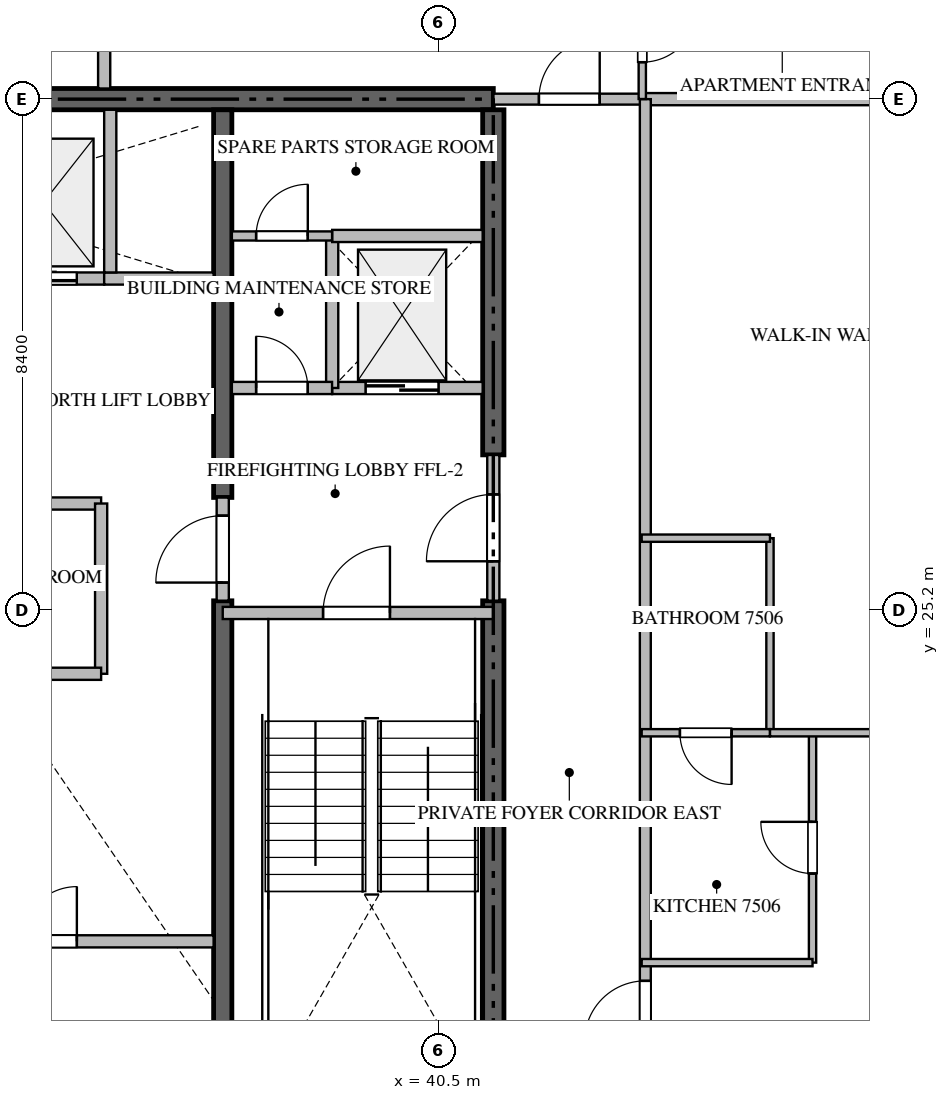
"""IFC4 building model, lengths in metres.
Left out: names, types, materials, properties, quantities, classifications, styles, units other than length and angle.
Written with IfcOpenShell. Run it as: python <this file> out.ifc"""

import sys

from ifc_helpers import new_model, si_unit, direction, frame, frame_2d, origin, place, context, subcontext, project, spatial, rectangle, extrude, source, transform, mapped, element, fill, save


model = new_model("IFC4")
c1 = context("Model", 3, precision=1e-05, world=origin(), true_north=direction((0.0, 1.0)))
c2 = subcontext(c1, "Body", "Model", "MODEL_VIEW")
j1 = project(units=[si_unit("LENGTHUNIT", "METRE"), si_unit("PLANEANGLEUNIT", "RADIAN")], contexts=[c1])
p1 = place(None, origin())
s1 = spatial("IfcSite", under=j1, at=p1, CompositionType="ELEMENT")
p2 = place(p1, origin())
s2 = spatial("IfcBuilding", under=s1, at=p2, CompositionType="ELEMENT")
p3 = place(p2, frame((0.0, 0.0, 301.55)))
s3 = spatial("IfcBuildingStorey", under=s2, at=p3, CompositionType="ELEMENT", Elevation=301.55)
p4 = place(p3, frame((41.4, 33.6, -0.26), z_axis=(0.0, 0.0, 1.0), x_axis=(-1.0, 0.0, 0.0)))
e1 = element("IfcWall", 1, at=p4, inside=s3, PredefinedType="SHEAR", context=c2, shape_type="SweptSolid", body=[
    extrude(rectangle(XDim=18.0, YDim=0.35, at=frame_2d((9.0, 0.0))), origin(), (0.0, 0.0, 1.0), 4.048),
])
p5 = place(p3, frame((41.4, 16.975, -0.26), z_axis=(0.0, 0.0, 1.0), x_axis=(0.0, 1.0, 0.0)))
e2 = element("IfcWall", 2, at=p5, inside=s3, PredefinedType="SHEAR", context=c2, shape_type="SweptSolid", body=[
    extrude(rectangle(XDim=8.375, YDim=0.35, at=frame_2d((4.188, 0.0))), origin(), (0.0, 0.0, 1.0), 4.048),
])
p6 = place(p3, frame((41.4, 27.75, -0.26), z_axis=(0.0, 0.0, 1.0), x_axis=(0.0, 1.0, 0.0)))
e3 = element("IfcWall", 3, at=p6, inside=s3, PredefinedType="SHEAR", context=c2, shape_type="SweptSolid", body=[
    extrude(rectangle(XDim=5.675, YDim=0.35, at=frame_2d((2.837, 0.0))), origin(), (0.0, 0.0, 1.0), 4.048),
])
p7 = place(p3, frame((36.95, 16.975, -0.26), z_axis=(0.0, 0.0, 1.0), x_axis=(0.0, 1.0, 0.0)))
e4 = element("IfcWall", 4, at=p7, inside=s3, PredefinedType="SHEAR", context=c2, shape_type="SweptSolid", body=[
    extrude(rectangle(XDim=8.375, YDim=0.3, at=frame_2d((4.188, 0.0))), origin(), (0.0, 0.0, 1.0), 4.048),
])
p8 = place(p3, frame((36.95, 27.05, -0.26), z_axis=(0.0, 0.0, 1.0), x_axis=(0.0, 1.0, 0.0)))
e5 = element("IfcWall", 5, at=p8, inside=s3, PredefinedType="SHEAR", context=c2, shape_type="SweptSolid", body=[
    extrude(rectangle(XDim=6.375, YDim=0.3, at=frame_2d((3.188, 0.0))), origin(), (0.0, 0.0, 1.0), 4.048),
])
p9 = place(p3, frame((36.95, 25.15, 0.0), z_axis=(0.0, 0.0, 1.0), x_axis=(1.0, 0.0, 0.0)))
e6 = element("IfcWall", 6, at=p9, inside=s3, PredefinedType="STANDARD", context=c2, shape_type="SweptSolid", body=[
    extrude(rectangle(XDim=4.45, YDim=0.2, at=frame_2d((2.225, 0.0))), origin(), (0.0, 0.0, 1.0), 3.79),
])
p10 = place(p9, frame((1.65, 0.0, 0.0)))
e7 = element("IfcOpeningElement", 7, at=p10, cuts=e6, PredefinedType="OPENING", context=c2, shape_type="SweptSolid", body=[
    extrude(rectangle(XDim=1.1, YDim=2.15, at=frame_2d((0.55, 1.075))), frame((0.0, 0.11, 0.0), z_axis=(0.0, -1.0, 0.0), x_axis=(1.0, 0.0, 0.0)), (0.0, 0.0, 1.0), 0.22),
])
p11 = place(p3, frame((38.75, 28.85, 0.0), z_axis=(0.0, 0.0, 1.0), x_axis=(1.0, 0.0, 0.0)))
e8 = element("IfcWall", 8, at=p11, inside=s3, PredefinedType="STANDARD", context=c2, shape_type="SweptSolid", body=[
    extrude(rectangle(XDim=2.475, YDim=0.2, at=frame_2d((1.238, 0.0))), origin(), (0.0, 0.0, 1.0), 3.79),
])
p12 = place(p11, frame((0.55, 0.0, 0.0)))
e9 = element("IfcOpeningElement", 9, at=p12, cuts=e8, PredefinedType="OPENING", context=c2, shape_type="SweptSolid", body=[
    extrude(rectangle(XDim=1.2, YDim=2.2, at=frame_2d((0.6, 1.1))), frame((0.0, 0.11, 0.0), z_axis=(0.0, -1.0, 0.0), x_axis=(1.0, 0.0, 0.0)), (0.0, 0.0, 1.0), 0.22),
])
p13 = place(p3, frame((32.85, 30.65, 0.0), z_axis=(0.0, 0.0, 1.0), x_axis=(1.0, 0.0, 0.0)))
e10 = element("IfcWall", 10, at=p13, inside=s3, PredefinedType="STANDARD", context=c2, shape_type="SweptSolid", body=[
    extrude(rectangle(XDim=2.15, YDim=0.2, at=frame_2d((1.075, 0.0))), origin(), (0.0, 0.0, 1.0), 3.79),
])
p14 = place(p13, frame((0.6, 0.0, 0.0)))
e11 = element("IfcOpeningElement", 11, at=p14, cuts=e10, PredefinedType="OPENING", context=c2, shape_type="SweptSolid", body=[
    extrude(rectangle(XDim=1.1, YDim=2.2, at=frame_2d((0.55, 1.1))), frame((0.0, 0.11, 0.0), z_axis=(0.0, -1.0, 0.0), x_axis=(1.0, 0.0, 0.0)), (0.0, 0.0, 1.0), 0.22),
])
p15 = place(p3, frame((35.0, 30.65, 0.0), z_axis=(0.0, 0.0, 1.0), x_axis=(1.0, 0.0, 0.0)))
e12 = element("IfcWall", 12, at=p15, inside=s3, PredefinedType="STANDARD", context=c2, shape_type="SweptSolid", body=[
    extrude(rectangle(XDim=1.8, YDim=0.2, at=frame_2d((0.9, 0.0))), origin(), (0.0, 0.0, 1.0), 3.79),
])
p16 = place(p3, frame((35.1, 30.75, 0.0), z_axis=(0.0, 0.0, 1.0), x_axis=(0.0, 1.0, 0.0)))
e13 = element("IfcWall", 13, at=p16, inside=s3, PredefinedType="STANDARD", context=c2, shape_type="SweptSolid", body=[
    extrude(rectangle(XDim=2.675, YDim=0.2, at=frame_2d((1.337, 0.0))), origin(), (0.0, 0.0, 1.0), 3.79),
])
p17 = place(p3, frame((38.75, 28.85, 0.0), z_axis=(0.0, 0.0, 1.0), x_axis=(0.0, 1.0, 0.0)))
e14 = element("IfcWall", 14, at=p17, inside=s3, PredefinedType="STANDARD", context=c2, shape_type="SweptSolid", body=[
    extrude(rectangle(XDim=2.5, YDim=0.2, at=frame_2d((1.25, 0.0))), origin(), (0.0, 0.0, 1.0), 3.79),
])
p18 = place(p3, frame((38.75, 31.35, 0.0), z_axis=(0.0, 0.0, 1.0), x_axis=(1.0, 0.0, 0.0)))
e15 = element("IfcWall", 15, at=p18, inside=s3, PredefinedType="STANDARD", context=c2, shape_type="SweptSolid", body=[
    extrude(rectangle(XDim=2.475, YDim=0.2, at=frame_2d((1.238, 0.0))), origin(), (0.0, 0.0, 1.0), 3.79),
])
p19 = place(p3, frame((37.1, 28.85, 0.0), z_axis=(0.0, 0.0, 1.0), x_axis=(1.0, 0.0, 0.0)))
e16 = element("IfcWall", 16, at=p19, inside=s3, PredefinedType="STANDARD", context=c2, shape_type="SweptSolid", body=[
    extrude(rectangle(XDim=1.648, YDim=0.2, at=frame_2d((0.824, 0.0))), origin(), (0.0, 0.0, 1.0), 3.79),
])
p20 = place(p19, frame((0.399, 0.0, 0.0)))
e17 = element("IfcOpeningElement", 17, at=p20, cuts=e16, PredefinedType="OPENING", context=c2, shape_type="SweptSolid", body=[
    extrude(rectangle(XDim=0.85, YDim=2.1, at=frame_2d((0.425, 1.05))), frame((0.0, 0.11, 0.0), z_axis=(0.0, -1.0, 0.0), x_axis=(1.0, 0.0, 0.0)), (0.0, 0.0, 1.0), 0.22),
])
p21 = place(p3, frame((41.4, 25.352, 0.0), z_axis=(0.0, 0.0, 1.0), x_axis=(0.0, 1.0, 0.0)))
e18 = element("IfcWall", 18, at=p21, inside=s3, PredefinedType="STANDARD", context=c2, shape_type="SweptSolid", body=[
    extrude(rectangle(XDim=2.396, YDim=0.2, at=frame_2d((1.198, 0.0))), origin(), (0.0, 0.0, 1.0), 3.79),
])
p22 = place(p21, frame((0.648, 0.0, 0.0)))
e19 = element("IfcOpeningElement", 19, at=p22, cuts=e18, PredefinedType="OPENING", context=c2, shape_type="SweptSolid", body=[
    extrude(rectangle(XDim=1.1, YDim=2.15, at=frame_2d((0.55, 1.075))), frame((0.0, 0.11, 0.0), z_axis=(0.0, -1.0, 0.0), x_axis=(1.0, 0.0, 0.0)), (0.0, 0.0, 1.0), 0.22),
])
p23 = place(p3, frame((36.95, 25.352, 0.0), z_axis=(0.0, 0.0, 1.0), x_axis=(0.0, 1.0, 0.0)))
e20 = element("IfcWall", 20, at=p23, inside=s3, PredefinedType="STANDARD", context=c2, shape_type="SweptSolid", body=[
    extrude(rectangle(XDim=1.696, YDim=0.2, at=frame_2d((0.848, 0.0))), origin(), (0.0, 0.0, 1.0), 3.79),
])
p24 = place(p23, frame((0.298, 0.0, 0.0)))
e21 = element("IfcOpeningElement", 21, at=p24, cuts=e20, PredefinedType="OPENING", context=c2, shape_type="SweptSolid", body=[
    extrude(rectangle(XDim=1.1, YDim=2.15, at=frame_2d((0.55, 1.075))), frame((0.0, 0.11, 0.0), z_axis=(0.0, -1.0, 0.0), x_axis=(1.0, 0.0, 0.0)), (0.0, 0.0, 1.0), 0.22),
])
p25 = place(p3, frame((37.1, 31.35, 0.0), z_axis=(0.0, 0.0, 1.0), x_axis=(1.0, 0.0, 0.0)))
e22 = element("IfcWall", 22, at=p25, inside=s3, PredefinedType="PARTITIONING", context=c2, shape_type="SweptSolid", body=[
    extrude(rectangle(XDim=1.648, YDim=0.15, at=frame_2d((0.824, 0.0))), origin(), (0.0, 0.0, 1.0), 3.79),
])
p26 = place(p25, frame((0.399, 0.0, 0.0)))
e23 = element("IfcOpeningElement", 23, at=p26, cuts=e22, PredefinedType="OPENING", context=c2, shape_type="SweptSolid", body=[
    extrude(rectangle(XDim=0.85, YDim=2.1, at=frame_2d((0.425, 1.05))), frame((0.0, 0.085, 0.0), z_axis=(0.0, -1.0, 0.0), x_axis=(1.0, 0.0, 0.0)), (0.0, 0.0, 1.0), 0.17),
])
p27 = place(p3, frame((31.402, 19.75, 0.0), z_axis=(0.0, 0.0, 1.0), x_axis=(1.0, 0.0, 0.0)))
e24 = element("IfcWall", 24, at=p27, inside=s3, PredefinedType="STANDARD", context=c2, shape_type="SweptSolid", body=[
    extrude(rectangle(XDim=5.398, YDim=0.2, at=frame_2d((2.699, 0.0))), origin(), (0.0, 0.0, 1.0), 3.79),
])
p28 = place(p27, frame((2.249, 0.0, 0.0)))
e25 = element("IfcOpeningElement", 25, at=p28, cuts=e24, PredefinedType="OPENING", context=c2, shape_type="SweptSolid", body=[
    extrude(rectangle(XDim=0.9, YDim=2.1, at=frame_2d((0.45, 1.05))), frame((0.0, 0.11, 0.0), z_axis=(0.0, -1.0, 0.0), x_axis=(1.0, 0.0, 0.0)), (0.0, 0.0, 1.0), 0.22),
])
p29 = place(p3, frame((28.0, 26.95, 0.0), z_axis=(0.0, 0.0, 1.0), x_axis=(1.0, 0.0, 0.0)))
e26 = element("IfcWall", 26, at=p29, inside=s3, PredefinedType="STANDARD", context=c2, shape_type="SweptSolid", body=[
    extrude(rectangle(XDim=6.95, YDim=0.2, at=frame_2d((3.475, 0.0))), origin(), (0.0, 0.0, 1.0), 3.79),
])
p30 = place(p3, frame((34.95, 24.15, 0.0), z_axis=(0.0, 0.0, 1.0), x_axis=(0.0, 1.0, 0.0)))
e27 = element("IfcWall", 27, at=p30, inside=s3, PredefinedType="STANDARD", context=c2, shape_type="SweptSolid", body=[
    extrude(rectangle(XDim=2.8, YDim=0.2, at=frame_2d((1.4, 0.0))), origin(), (0.0, 0.0, 1.0), 3.79),
])
p31 = place(p3, frame((31.5, 24.15, 0.0), z_axis=(0.0, 0.0, 1.0), x_axis=(1.0, 0.0, 0.0)))
e28 = element("IfcWall", 28, at=p31, inside=s3, PredefinedType="STANDARD", context=c2, shape_type="SweptSolid", body=[
    extrude(rectangle(XDim=3.45, YDim=0.2, at=frame_2d((1.725, 0.0))), origin(), (0.0, 0.0, 1.0), 3.79),
])
p32 = place(p31, frame((1.3, 0.0, 0.0)))
e29 = element("IfcOpeningElement", 29, at=p32, cuts=e28, PredefinedType="OPENING", context=c2, shape_type="SweptSolid", body=[
    extrude(rectangle(XDim=0.85, YDim=2.1, at=frame_2d((0.425, 1.05))), frame((0.0, 0.11, 0.0), z_axis=(0.0, -1.0, 0.0), x_axis=(1.0, 0.0, 0.0)), (0.0, 0.0, 1.0), 0.22),
])
p33 = place(p3, frame((35.0, 33.775, 0.0), z_axis=(0.0, 0.0, 1.0), x_axis=(0.0, 1.0, 0.0)))
e30 = element("IfcWall", 30, at=p33, inside=s3, PredefinedType="PARTITIONING", context=c2, shape_type="SweptSolid", body=[
    extrude(rectangle(XDim=14.143, YDim=0.2, at=frame_2d((7.072, 0.0))), origin(), (0.0, 0.0, 1.0), 3.79),
])
p34 = place(p3, frame((43.9, 33.6, 0.0), z_axis=(0.0, 0.0, 1.0), x_axis=(1.0, 0.0, 0.0)))
e31 = element("IfcWall", 31, at=p34, inside=s3, PredefinedType="PARTITIONING", context=c2, shape_type="SweptSolid", body=[
    extrude(rectangle(XDim=11.618, YDim=0.2, at=frame_2d((5.809, 0.0))), origin(), (0.0, 0.0, 1.0), 3.79),
])
p35 = place(p3, frame((41.402, 33.6, 0.0), z_axis=(0.0, 0.0, 1.0), x_axis=(1.0, 0.0, 0.0)))
e32 = element("IfcWall", 32, at=p35, inside=s3, PredefinedType="PARTITIONING", context=c2, shape_type="SweptSolid", body=[
    extrude(rectangle(XDim=2.496, YDim=0.18, at=frame_2d((1.248, 0.0))), origin(), (0.0, 0.0, 1.0), 3.79),
])
p36 = place(p35, frame((0.748, 0.0, 0.0)))
e33 = element("IfcOpeningElement", 33, at=p36, cuts=e32, PredefinedType="OPENING", context=c2, shape_type="SweptSolid", body=[
    extrude(rectangle(XDim=1.0, YDim=2.15, at=frame_2d((0.5, 1.075))), frame((0.0, 0.1, 0.0), z_axis=(0.0, -1.0, 0.0), x_axis=(1.0, 0.0, 0.0)), (0.0, 0.0, 1.0), 0.2),
])
p37 = place(p3, frame((43.9, 16.8, 0.0), z_axis=(0.0, 0.0, 1.0), x_axis=(0.0, 1.0, 0.0)))
e34 = element("IfcWall", 34, at=p37, inside=s3, PredefinedType="PARTITIONING", context=c2, shape_type="SweptSolid", body=[
    extrude(rectangle(XDim=16.8, YDim=0.18, at=frame_2d((8.4, 0.0))), origin(), (0.0, 0.0, 1.0), 3.79),
])
p38 = place(p37, frame((1.3, 0.0, 0.0)))
e35 = element("IfcOpeningElement", 35, at=p38, cuts=e34, PredefinedType="OPENING", context=c2, shape_type="SweptSolid", body=[
    extrude(rectangle(XDim=1.0, YDim=2.15, at=frame_2d((0.5, 1.075))), frame((0.0, 0.1, 0.0), z_axis=(0.0, -1.0, 0.0), x_axis=(1.0, 0.0, 0.0)), (0.0, 0.0, 1.0), 0.2),
])
p39 = place(p3, frame((43.85, 35.75, 0.0), z_axis=(0.0, 0.0, 1.0), x_axis=(0.0, -1.0, 0.0)))
e36 = element("IfcWall", 36, at=p39, inside=s3, PredefinedType="PARTITIONING", context=c2, shape_type="SweptSolid", body=[
    extrude(rectangle(XDim=2.148, YDim=0.12, at=frame_2d((1.074, 0.0))), origin(), (0.0, 0.0, 1.0), 3.79),
])
p40 = place(p39, frame((0.642, 0.0, 0.0)))
e37 = element("IfcOpeningElement", 37, at=p40, cuts=e36, PredefinedType="OPENING", context=c2, shape_type="SweptSolid", body=[
    extrude(rectangle(XDim=0.9, YDim=2.1, at=frame_2d((0.45, 1.05))), frame((0.0, 0.07, 0.0), z_axis=(0.0, -1.0, 0.0), x_axis=(1.0, 0.0, 0.0)), (0.0, 0.0, 1.0), 0.14),
])
p41 = place(p3, frame((46.65, 19.4, 0.0), z_axis=(0.0, 0.0, 1.0), x_axis=(0.0, 1.0, 0.0)))
e38 = element("IfcWall", 38, at=p41, inside=s3, PredefinedType="PARTITIONING", context=c2, shape_type="SweptSolid", body=[
    extrude(rectangle(XDim=3.78, YDim=0.12, at=frame_2d((1.89, 0.0))), origin(), (0.0, 0.0, 1.0), 3.79),
])
p42 = place(p41, frame((1.465, 0.0, 0.0)))
e39 = element("IfcOpeningElement", 39, at=p42, cuts=e38, PredefinedType="OPENING", context=c2, shape_type="SweptSolid", body=[
    extrude(rectangle(XDim=0.85, YDim=2.1, at=frame_2d((0.425, 1.05))), frame((0.0, 0.07, 0.0), z_axis=(0.0, -1.0, 0.0), x_axis=(1.0, 0.0, 0.0)), (0.0, 0.0, 1.0), 0.14),
])
p43 = place(p3, frame((46.65, 19.4, 0.0), z_axis=(0.0, 0.0, 1.0), x_axis=(-1.0, 0.0, 0.0)))
e40 = element("IfcWall", 40, at=p43, inside=s3, PredefinedType="PARTITIONING", context=c2, shape_type="SweptSolid", body=[
    extrude(rectangle(XDim=2.81, YDim=0.12, at=frame_2d((1.405, 0.0))), origin(), (0.0, 0.0, 1.0), 3.79),
])
p44 = place(p3, frame((45.95, 23.18, 0.0), z_axis=(0.0, 0.0, 1.0), x_axis=(0.0, 1.0, 0.0)))
e41 = element("IfcWall", 41, at=p44, inside=s3, PredefinedType="PARTITIONING", context=c2, shape_type="SweptSolid", body=[
    extrude(rectangle(XDim=3.2, YDim=0.12, at=frame_2d((1.6, 0.0))), origin(), (0.0, 0.0, 1.0), 3.79),
])
p45 = place(p3, frame((45.95, 26.38, 0.0), z_axis=(0.0, 0.0, 1.0), x_axis=(-1.0, 0.0, 0.0)))
e42 = element("IfcWall", 42, at=p45, inside=s3, PredefinedType="PARTITIONING", context=c2, shape_type="SweptSolid", body=[
    extrude(rectangle(XDim=2.11, YDim=0.12, at=frame_2d((1.055, 0.0))), origin(), (0.0, 0.0, 1.0), 3.79),
])
p46 = place(p3, frame((51.409, 23.18, 0.0), z_axis=(0.0, 0.0, 1.0), x_axis=(-1.0, 0.0, 0.0)))
e43 = element("IfcWall", 43, at=p46, inside=s3, PredefinedType="PARTITIONING", context=c2, shape_type="SweptSolid", body=[
    extrude(rectangle(XDim=5.459, YDim=0.12, at=frame_2d((2.729, 0.0))), origin(), (0.0, 0.0, 1.0), 3.79),
])
p47 = place(p46, frame((2.304, 0.0, 0.0)))
e44 = element("IfcOpeningElement", 44, at=p47, cuts=e43, PredefinedType="OPENING", context=c2, shape_type="SweptSolid", body=[
    extrude(rectangle(XDim=0.85, YDim=2.1, at=frame_2d((0.425, 1.05))), frame((0.0, 0.07, 0.0), z_axis=(0.0, -1.0, 0.0), x_axis=(1.0, 0.0, 0.0)), (0.0, 0.0, 1.0), 0.14),
])
p48 = place(p3, frame((45.948, 23.18, 0.0), z_axis=(0.0, 0.0, 1.0), x_axis=(-1.0, 0.0, 0.0)))
e45 = element("IfcWall", 45, at=p48, inside=s3, PredefinedType="PARTITIONING", context=c2, shape_type="SweptSolid", body=[
    extrude(rectangle(XDim=2.108, YDim=0.12, at=frame_2d((1.054, 0.0))), origin(), (0.0, 0.0, 1.0), 3.79),
])
p49 = place(p48, frame((0.629, 0.0, 0.0)))
e46 = element("IfcOpeningElement", 46, at=p49, cuts=e45, PredefinedType="OPENING", context=c2, shape_type="SweptSolid", body=[
    extrude(rectangle(XDim=0.85, YDim=2.1, at=frame_2d((0.425, 1.05))), frame((0.0, 0.07, 0.0), z_axis=(0.0, -1.0, 0.0), x_axis=(1.0, 0.0, 0.0)), (0.0, 0.0, 1.0), 0.14),
])
m1 = source(origin(), c2, "Body", "SweptSolid", [
    extrude(rectangle(XDim=1.1, YDim=2.15, at=frame_2d((0.55, 1.075))), frame((0.0, 0.025, 0.0), z_axis=(0.0, -1.0, 0.0), x_axis=(1.0, 0.0, 0.0)), (0.0, 0.0, 1.0), 0.05),
])
p50 = place(p10, origin())
e47 = element("IfcDoor", 47, at=p50, inside=s3, OperationType="SINGLE_SWING_RIGHT", PredefinedType="DOOR", context=c2, shape_type="MappedRepresentation", body=[
    mapped(m1, transform((0.0, 0.0, 0.0), scale=1.0)),
])
fill(e7, e47)
m2 = source(origin(), c2, "Body", "SweptSolid", [
    extrude(rectangle(XDim=1.2, YDim=2.2, at=frame_2d((0.6, 1.1))), frame((0.0, 0.025, 0.0), z_axis=(0.0, -1.0, 0.0), x_axis=(1.0, 0.0, 0.0)), (0.0, 0.0, 1.0), 0.05),
])
p51 = place(p12, origin())
e48 = element("IfcDoor", 48, at=p51, inside=s3, OperationType="DOUBLE_DOOR_SLIDING", PredefinedType="DOOR", context=c2, shape_type="MappedRepresentation", body=[
    mapped(m2, transform((0.0, 0.0, 0.0), scale=1.0)),
])
fill(e9, e48)
m3 = source(origin(), c2, "Body", "SweptSolid", [
    extrude(rectangle(XDim=1.1, YDim=2.2, at=frame_2d((0.55, 1.1))), frame((0.0, 0.025, 0.0), z_axis=(0.0, -1.0, 0.0), x_axis=(1.0, 0.0, 0.0)), (0.0, 0.0, 1.0), 0.05),
])
p52 = place(p14, origin())
e49 = element("IfcDoor", 49, at=p52, inside=s3, OperationType="DOUBLE_DOOR_SLIDING", PredefinedType="DOOR", context=c2, shape_type="MappedRepresentation", body=[
    mapped(m3, transform((0.0, 0.0, 0.0), scale=1.0)),
])
fill(e11, e49)
m4 = source(origin(), c2, "Body", "SweptSolid", [
    extrude(rectangle(XDim=0.85, YDim=2.1, at=frame_2d((0.425, 1.05))), frame((0.0, 0.025, 0.0), z_axis=(0.0, -1.0, 0.0), x_axis=(1.0, 0.0, 0.0)), (0.0, 0.0, 1.0), 0.05),
])
p53 = place(p20, origin())
e50 = element("IfcDoor", 50, at=p53, inside=s3, OperationType="SINGLE_SWING_LEFT", PredefinedType="DOOR", context=c2, shape_type="MappedRepresentation", body=[
    mapped(m4, transform((0.0, 0.0, 0.0), scale=1.0)),
])
fill(e17, e50)
p54 = place(p22, origin())
e51 = element("IfcDoor", 51, at=p54, inside=s3, OperationType="SINGLE_SWING_LEFT", PredefinedType="DOOR", context=c2, shape_type="MappedRepresentation", body=[
    mapped(m1, transform((0.0, 0.0, 0.0), scale=1.0)),
])
fill(e19, e51)
p55 = place(p24, origin())
e52 = element("IfcDoor", 52, at=p55, inside=s3, OperationType="SINGLE_SWING_LEFT", PredefinedType="DOOR", context=c2, shape_type="MappedRepresentation", body=[
    mapped(m1, transform((0.0, 0.0, 0.0), scale=1.0)),
])
fill(e21, e52)
p56 = place(p26, origin())
e53 = element("IfcDoor", 53, at=p56, inside=s3, OperationType="SINGLE_SWING_RIGHT", PredefinedType="DOOR", context=c2, shape_type="MappedRepresentation", body=[
    mapped(m4, transform((0.0, 0.0, 0.0), scale=1.0)),
])
fill(e23, e53)
m5 = source(origin(), c2, "Body", "SweptSolid", [
    extrude(rectangle(XDim=0.9, YDim=2.1, at=frame_2d((0.45, 1.05))), frame((0.0, 0.025, 0.0), z_axis=(0.0, -1.0, 0.0), x_axis=(1.0, 0.0, 0.0)), (0.0, 0.0, 1.0), 0.05),
])
p57 = place(p28, origin())
e54 = element("IfcDoor", 54, at=p57, inside=s3, OperationType="SINGLE_SWING_RIGHT", PredefinedType="DOOR", context=c2, shape_type="MappedRepresentation", body=[
    mapped(m5, transform((0.0, 0.0, 0.0), scale=1.0)),
])
fill(e25, e54)
m6 = source(origin(), c2, "Body", "SweptSolid", [
    extrude(rectangle(XDim=1.0, YDim=2.15, at=frame_2d((0.5, 1.075))), frame((0.0, 0.025, 0.0), z_axis=(0.0, -1.0, 0.0), x_axis=(1.0, 0.0, 0.0)), (0.0, 0.0, 1.0), 0.05),
])
p58 = place(p36, origin())
e55 = element("IfcDoor", 55, at=p58, inside=s3, OperationType="SINGLE_SWING_RIGHT", PredefinedType="DOOR", context=c2, shape_type="MappedRepresentation", body=[
    mapped(m6, transform((0.0, 0.0, 0.0), scale=1.0)),
])
fill(e33, e55)
p59 = place(p38, origin())
e56 = element("IfcDoor", 56, at=p59, inside=s3, OperationType="SINGLE_SWING_LEFT", PredefinedType="DOOR", context=c2, shape_type="MappedRepresentation", body=[
    mapped(m6, transform((0.0, 0.0, 0.0), scale=1.0)),
])
fill(e35, e56)
p60 = place(p40, origin())
e57 = element("IfcDoor", 57, at=p60, inside=s3, OperationType="SINGLE_SWING_LEFT", PredefinedType="DOOR", context=c2, shape_type="MappedRepresentation", body=[
    mapped(m5, transform((0.0, 0.0, 0.0), scale=1.0)),
])
fill(e37, e57)
p61 = place(p42, origin())
e58 = element("IfcDoor", 58, at=p61, inside=s3, OperationType="SINGLE_SWING_RIGHT", PredefinedType="DOOR", context=c2, shape_type="MappedRepresentation", body=[
    mapped(m4, transform((0.0, 0.0, 0.0), scale=1.0)),
])
fill(e39, e58)
p62 = place(p49, origin())
e59 = element("IfcDoor", 59, at=p62, inside=s3, OperationType="SINGLE_SWING_LEFT", PredefinedType="DOOR", context=c2, shape_type="MappedRepresentation", body=[
    mapped(m4, transform((0.0, 0.0, 0.0), scale=1.0)),
])
fill(e46, e59)
save(model, sys.argv[1])
